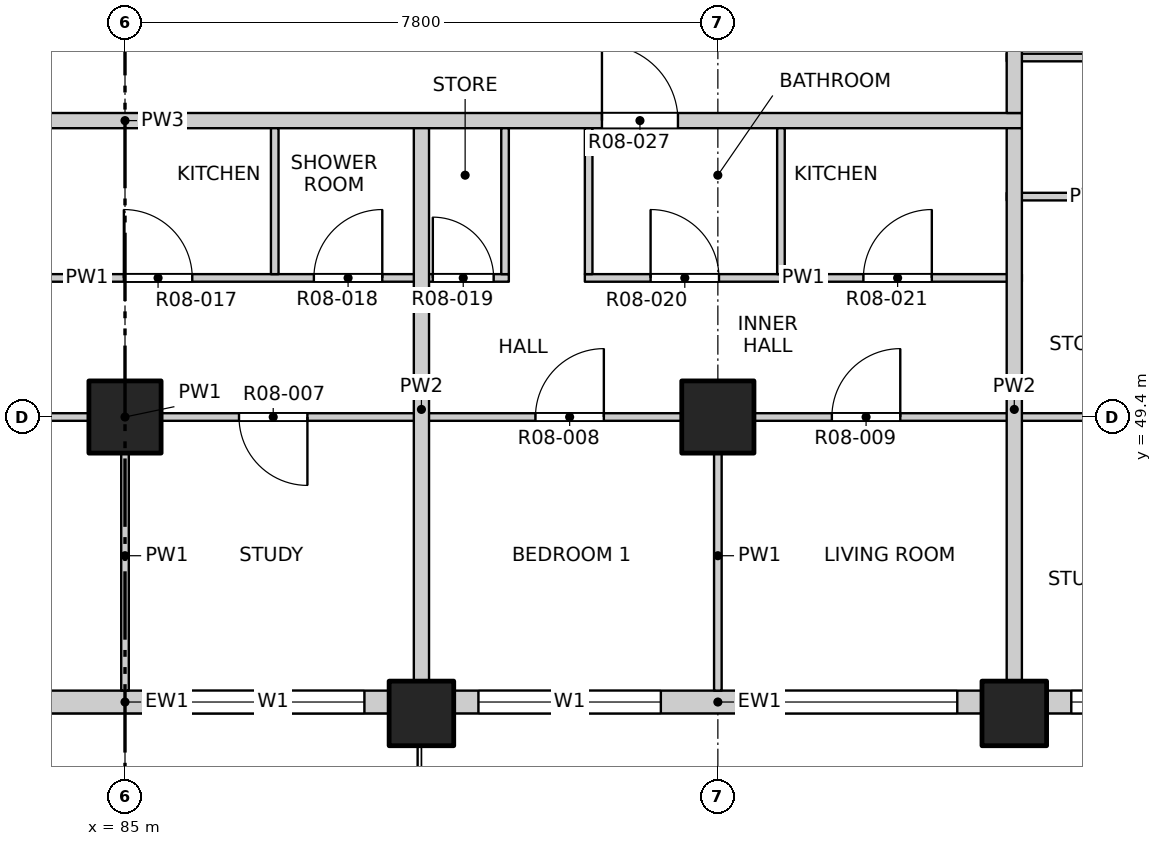
"""IFC4 building model, lengths in metres.
Left out: names, types, materials, properties, quantities, classifications, styles, units other than length and angle.
Written with IfcOpenShell. Run it as: python <this file> out.ifc"""

import sys

from ifc_helpers import new_model, si_unit, direction, frame, frame_2d, origin, origin_2d, place, context, subcontext, project, spatial, rectangle, extrude, element, fill, save


model = new_model("IFC4")
c1 = context("Model", 3, precision=1e-05, world=origin(), true_north=direction((0.0, 1.0)))
c2 = subcontext(c1, "Body", "Model", "MODEL_VIEW")
j1 = project(units=[si_unit("LENGTHUNIT", "METRE"), si_unit("PLANEANGLEUNIT", "RADIAN")], contexts=[c1])
p1 = place(None, origin())
s1 = spatial("IfcSite", under=j1, at=p1, CompositionType="ELEMENT")
p2 = place(p1, origin())
s2 = spatial("IfcBuilding", under=s1, at=p2, CompositionType="ELEMENT")
p3 = place(p2, frame((0.0, 0.0, 103.3)))
s3 = spatial("IfcBuildingStorey", under=s2, at=p3, CompositionType="ELEMENT", Elevation=103.3)
for number, where, z_axis, x_axis in (
    (1, (88.9, 45.5, -0.25), (0.0, 0.0, 1.0), (1.0, 0.0, 0.0)),
    (2, (96.7, 45.5, -0.25), (0.0, 0.0, 1.0), (1.0, 0.0, 0.0)),
):
    element("IfcColumn", number, at=place(p3, frame(where, z_axis=z_axis, x_axis=x_axis)), inside=s3, PredefinedType="COLUMN", context=c2, shape_type="SweptSolid", body=[
        extrude(rectangle(XDim=0.85, YDim=0.85, at=origin_2d()), origin(), (0.0, 0.0, 1.0), 3.4),
    ])
for number, where, z_axis, x_axis in (
    (3, (85.0, 49.4, -0.25), (0.0, 0.0, 1.0), (1.0, 0.0, 0.0)),
    (4, (92.8, 49.4, -0.25), (0.0, 0.0, 1.0), (1.0, 0.0, 0.0)),
):
    element("IfcColumn", number, at=place(p3, frame(where, z_axis=z_axis, x_axis=x_axis)), inside=s3, PredefinedType="COLUMN", context=c2, shape_type="SweptSolid", body=[
        extrude(rectangle(XDim=0.95, YDim=0.95, at=origin_2d()), origin(), (0.0, 0.0, 1.0), 3.4),
    ])
p4 = place(p3, frame((81.525, 45.65, 0.0), z_axis=(0.0, 0.0, 1.0), x_axis=(1.0, 0.0, 0.0)))
e5 = element("IfcWall", 5, at=p4, inside=s3, PredefinedType="SOLIDWALL", context=c2, shape_type="SweptSolid", body=[
    extrude(rectangle(XDim=6.95, YDim=0.3, at=frame_2d((3.475, 0.0))), origin(), (0.0, 0.0, 1.0), 2.7),
])
p5 = place(p4, frame((0.625, 0.0, 0.0)))
e6 = element("IfcOpeningElement", 6, at=p5, cuts=e5, PredefinedType="OPENING", context=c2, shape_type="SweptSolid", body=[
    extrude(rectangle(XDim=1.8, YDim=2.4, at=frame_2d((0.9, 1.2))), frame((0.0, 0.16, 0.0), z_axis=(0.0, -1.0, 0.0), x_axis=(1.0, 0.0, 0.0)), (0.0, 0.0, 1.0), 0.32),
])
p6 = place(p4, frame((4.225, 0.0, 0.9)))
e7 = element("IfcOpeningElement", 7, at=p6, cuts=e5, PredefinedType="OPENING", context=c2, shape_type="SweptSolid", body=[
    extrude(rectangle(XDim=2.4, YDim=1.8, at=frame_2d((1.2, 0.9))), frame((0.0, 0.16, 0.0), z_axis=(0.0, -1.0, 0.0), x_axis=(1.0, 0.0, 0.0)), (0.0, 0.0, 1.0), 0.32),
])
p7 = place(p3, frame((89.325, 45.65, 0.0), z_axis=(0.0, 0.0, 1.0), x_axis=(1.0, 0.0, 0.0)))
e8 = element("IfcWall", 8, at=p7, inside=s3, PredefinedType="SOLIDWALL", context=c2, shape_type="SweptSolid", body=[
    extrude(rectangle(XDim=6.95, YDim=0.3, at=frame_2d((3.475, 0.0))), origin(), (0.0, 0.0, 1.0), 2.7),
])
p8 = place(p7, frame((0.325, 0.0, 0.9)))
e9 = element("IfcOpeningElement", 9, at=p8, cuts=e8, PredefinedType="OPENING", context=c2, shape_type="SweptSolid", body=[
    extrude(rectangle(XDim=2.4, YDim=1.8, at=frame_2d((1.2, 0.9))), frame((0.0, 0.16, 0.0), z_axis=(0.0, -1.0, 0.0), x_axis=(1.0, 0.0, 0.0)), (0.0, 0.0, 1.0), 0.32),
])
p9 = place(p7, frame((4.225, 0.0, 0.9)))
e10 = element("IfcOpeningElement", 10, at=p9, cuts=e8, PredefinedType="OPENING", context=c2, shape_type="SweptSolid", body=[
    extrude(rectangle(XDim=2.4, YDim=1.8, at=frame_2d((1.2, 0.9))), frame((0.0, 0.16, 0.0), z_axis=(0.0, -1.0, 0.0), x_axis=(1.0, 0.0, 0.0)), (0.0, 0.0, 1.0), 0.32),
])
p10 = place(p3, frame((97.125, 45.65, 0.0), z_axis=(0.0, 0.0, 1.0), x_axis=(1.0, 0.0, 0.0)))
e11 = element("IfcWall", 11, at=p10, inside=s3, PredefinedType="SOLIDWALL", context=c2, shape_type="SweptSolid", body=[
    extrude(rectangle(XDim=3.475, YDim=0.3, at=frame_2d((1.738, 0.0))), origin(), (0.0, 0.0, 1.0), 2.7),
])
p11 = place(p10, frame((0.325, 0.0, 0.9)))
e12 = element("IfcOpeningElement", 12, at=p11, cuts=e11, PredefinedType="OPENING", context=c2, shape_type="SweptSolid", body=[
    extrude(rectangle(XDim=2.4, YDim=1.8, at=frame_2d((1.2, 0.9))), frame((0.0, 0.16, 0.0), z_axis=(0.0, -1.0, 0.0), x_axis=(1.0, 0.0, 0.0)), (0.0, 0.0, 1.0), 0.32),
])
p12 = place(p3, frame((65.8, 49.4, 0.0), z_axis=(0.0, 0.0, 1.0), x_axis=(1.0, 0.0, 0.0)))
e13 = element("IfcWall", 13, at=p12, inside=s3, PredefinedType="PARTITIONING", context=c2, shape_type="SweptSolid", body=[
    extrude(rectangle(XDim=38.4, YDim=0.1, at=frame_2d((19.2, 0.0))), origin(), (0.0, 0.0, 1.0), 3.15),
])
p13 = place(p12, frame((4.19, 0.0, 0.0)))
e14 = element("IfcOpeningElement", 14, at=p13, cuts=e13, PredefinedType="OPENING", context=c2, shape_type="SweptSolid", body=[
    extrude(rectangle(XDim=0.9, YDim=2.1, at=frame_2d((0.45, 1.05))), frame((0.0, 0.06, 0.0), z_axis=(0.0, -1.0, 0.0), x_axis=(1.0, 0.0, 0.0)), (0.0, 0.0, 1.0), 0.12),
])
p14 = place(p12, frame((9.0, 0.0, 0.0)))
e15 = element("IfcOpeningElement", 15, at=p14, cuts=e13, PredefinedType="OPENING", context=c2, shape_type="SweptSolid", body=[
    extrude(rectangle(XDim=0.9, YDim=2.1, at=frame_2d((0.45, 1.05))), frame((0.0, 0.06, 0.0), z_axis=(0.0, -1.0, 0.0), x_axis=(1.0, 0.0, 0.0)), (0.0, 0.0, 1.0), 0.12),
])
p15 = place(p12, frame((12.9, 0.0, 0.0)))
e16 = element("IfcOpeningElement", 16, at=p15, cuts=e13, PredefinedType="OPENING", context=c2, shape_type="SweptSolid", body=[
    extrude(rectangle(XDim=0.9, YDim=2.1, at=frame_2d((0.45, 1.05))), frame((0.0, 0.06, 0.0), z_axis=(0.0, -1.0, 0.0), x_axis=(1.0, 0.0, 0.0)), (0.0, 0.0, 1.0), 0.12),
])
p16 = place(p12, frame((16.8, 0.0, 0.0)))
e17 = element("IfcOpeningElement", 17, at=p16, cuts=e13, PredefinedType="OPENING", context=c2, shape_type="SweptSolid", body=[
    extrude(rectangle(XDim=0.9, YDim=2.1, at=frame_2d((0.45, 1.05))), frame((0.0, 0.06, 0.0), z_axis=(0.0, -1.0, 0.0), x_axis=(1.0, 0.0, 0.0)), (0.0, 0.0, 1.0), 0.12),
])
p17 = place(p12, frame((20.7, 0.0, 0.0)))
e18 = element("IfcOpeningElement", 18, at=p17, cuts=e13, PredefinedType="OPENING", context=c2, shape_type="SweptSolid", body=[
    extrude(rectangle(XDim=0.9, YDim=2.1, at=frame_2d((0.45, 1.05))), frame((0.0, 0.06, 0.0), z_axis=(0.0, -1.0, 0.0), x_axis=(1.0, 0.0, 0.0)), (0.0, 0.0, 1.0), 0.12),
])
p18 = place(p12, frame((24.6, 0.0, 0.0)))
e19 = element("IfcOpeningElement", 19, at=p18, cuts=e13, PredefinedType="OPENING", context=c2, shape_type="SweptSolid", body=[
    extrude(rectangle(XDim=0.9, YDim=2.1, at=frame_2d((0.45, 1.05))), frame((0.0, 0.06, 0.0), z_axis=(0.0, -1.0, 0.0), x_axis=(1.0, 0.0, 0.0)), (0.0, 0.0, 1.0), 0.12),
])
p19 = place(p12, frame((28.5, 0.0, 0.0)))
e20 = element("IfcOpeningElement", 20, at=p19, cuts=e13, PredefinedType="OPENING", context=c2, shape_type="SweptSolid", body=[
    extrude(rectangle(XDim=0.9, YDim=2.1, at=frame_2d((0.45, 1.05))), frame((0.0, 0.06, 0.0), z_axis=(0.0, -1.0, 0.0), x_axis=(1.0, 0.0, 0.0)), (0.0, 0.0, 1.0), 0.12),
])
p20 = place(p12, frame((33.31, 0.0, 0.0)))
e21 = element("IfcOpeningElement", 21, at=p20, cuts=e13, PredefinedType="OPENING", context=c2, shape_type="SweptSolid", body=[
    extrude(rectangle(XDim=0.9, YDim=2.1, at=frame_2d((0.45, 1.05))), frame((0.0, 0.06, 0.0), z_axis=(0.0, -1.0, 0.0), x_axis=(1.0, 0.0, 0.0)), (0.0, 0.0, 1.0), 0.12),
])
p21 = place(p3, frame((78.95, 51.23, 0.0), z_axis=(0.0, 0.0, 1.0), x_axis=(1.0, 0.0, 0.0)))
e22 = element("IfcWall", 22, at=p21, inside=s3, PredefinedType="PARTITIONING", context=c2, shape_type="SweptSolid", body=[
    extrude(rectangle(XDim=11.1, YDim=0.1, at=frame_2d((5.55, 0.0))), origin(), (0.0, 0.0, 1.0), 3.15),
])
p22 = place(p21, frame((0.875, 0.0, 0.0)))
e23 = element("IfcOpeningElement", 23, at=p22, cuts=e22, PredefinedType="OPENING", context=c2, shape_type="SweptSolid", body=[
    extrude(rectangle(XDim=0.8, YDim=2.1, at=frame_2d((0.4, 1.05))), frame((0.0, 0.06, 0.0), z_axis=(0.0, -1.0, 0.0), x_axis=(1.0, 0.0, 0.0)), (0.0, 0.0, 1.0), 0.12),
])
p23 = place(p21, frame((3.325, 0.0, 0.0)))
e24 = element("IfcOpeningElement", 24, at=p23, cuts=e22, PredefinedType="OPENING", context=c2, shape_type="SweptSolid", body=[
    extrude(rectangle(XDim=0.8, YDim=2.1, at=frame_2d((0.4, 1.05))), frame((0.0, 0.06, 0.0), z_axis=(0.0, -1.0, 0.0), x_axis=(1.0, 0.0, 0.0)), (0.0, 0.0, 1.0), 0.12),
])
p24 = place(p21, frame((6.035, 0.0, 0.0)))
e25 = element("IfcOpeningElement", 25, at=p24, cuts=e22, PredefinedType="OPENING", context=c2, shape_type="SweptSolid", body=[
    extrude(rectangle(XDim=0.9, YDim=2.1, at=frame_2d((0.45, 1.05))), frame((0.0, 0.06, 0.0), z_axis=(0.0, -1.0, 0.0), x_axis=(1.0, 0.0, 0.0)), (0.0, 0.0, 1.0), 0.12),
])
p25 = place(p21, frame((8.535, 0.0, 0.0)))
e26 = element("IfcOpeningElement", 26, at=p25, cuts=e22, PredefinedType="OPENING", context=c2, shape_type="SweptSolid", body=[
    extrude(rectangle(XDim=0.9, YDim=2.1, at=frame_2d((0.45, 1.05))), frame((0.0, 0.06, 0.0), z_axis=(0.0, -1.0, 0.0), x_axis=(1.0, 0.0, 0.0)), (0.0, 0.0, 1.0), 0.12),
])
p26 = place(p21, frame((10.1, 0.0, 0.0)))
e27 = element("IfcOpeningElement", 27, at=p26, cuts=e22, PredefinedType="OPENING", context=c2, shape_type="SweptSolid", body=[
    extrude(rectangle(XDim=0.8, YDim=2.1, at=frame_2d((0.4, 1.05))), frame((0.0, 0.06, 0.0), z_axis=(0.0, -1.0, 0.0), x_axis=(1.0, 0.0, 0.0)), (0.0, 0.0, 1.0), 0.12),
])
p27 = place(p3, frame((91.05, 51.23, 0.0), z_axis=(0.0, 0.0, 1.0), x_axis=(1.0, 0.0, 0.0)))
e28 = element("IfcWall", 28, at=p27, inside=s3, PredefinedType="PARTITIONING", context=c2, shape_type="SweptSolid", body=[
    extrude(rectangle(XDim=5.75, YDim=0.1, at=frame_2d((2.875, 0.0))), origin(), (0.0, 0.0, 1.0), 3.15),
])
p28 = place(p27, frame((0.865, 0.0, 0.0)))
e29 = element("IfcOpeningElement", 29, at=p28, cuts=e28, PredefinedType="OPENING", context=c2, shape_type="SweptSolid", body=[
    extrude(rectangle(XDim=0.9, YDim=2.1, at=frame_2d((0.45, 1.05))), frame((0.0, 0.06, 0.0), z_axis=(0.0, -1.0, 0.0), x_axis=(1.0, 0.0, 0.0)), (0.0, 0.0, 1.0), 0.12),
])
p29 = place(p27, frame((3.665, 0.0, 0.0)))
e30 = element("IfcOpeningElement", 30, at=p29, cuts=e28, PredefinedType="OPENING", context=c2, shape_type="SweptSolid", body=[
    extrude(rectangle(XDim=0.9, YDim=2.1, at=frame_2d((0.45, 1.05))), frame((0.0, 0.06, 0.0), z_axis=(0.0, -1.0, 0.0), x_axis=(1.0, 0.0, 0.0)), (0.0, 0.0, 1.0), 0.12),
])
p30 = place(p3, frame((96.6, 52.3, 0.0), z_axis=(0.0, 0.0, 1.0), x_axis=(1.0, 0.0, 0.0)))
e31 = element("IfcWall", 31, at=p30, inside=s3, PredefinedType="PARTITIONING", context=c2, shape_type="SweptSolid", body=[
    extrude(rectangle(XDim=2.22, YDim=0.1, at=frame_2d((1.11, 0.0))), origin(), (0.0, 0.0, 1.0), 3.15),
])
p31 = place(p3, frame((73.2, 53.3, 0.0), z_axis=(0.0, 0.0, 1.0), x_axis=(1.0, 0.0, 0.0)))
e32 = element("IfcWall", 32, at=p31, inside=s3, PredefinedType="PARTITIONING", context=c2, shape_type="SweptSolid", body=[
    extrude(rectangle(XDim=23.6, YDim=0.2, at=frame_2d((11.8, 0.0))), origin(), (0.0, 0.0, 1.0), 3.15),
])
p32 = place(p31, frame((5.975, 0.0, 0.0)))
e33 = element("IfcOpeningElement", 33, at=p32, cuts=e32, PredefinedType="OPENING", context=c2, shape_type="SweptSolid", body=[
    extrude(rectangle(XDim=1.0, YDim=2.1, at=frame_2d((0.5, 1.05))), frame((0.0, 0.11, 0.0), z_axis=(0.0, -1.0, 0.0), x_axis=(1.0, 0.0, 0.0)), (0.0, 0.0, 1.0), 0.22),
])
p33 = place(p31, frame((18.075, 0.0, 0.0)))
e34 = element("IfcOpeningElement", 34, at=p33, cuts=e32, PredefinedType="OPENING", context=c2, shape_type="SweptSolid", body=[
    extrude(rectangle(XDim=1.0, YDim=2.1, at=frame_2d((0.5, 1.05))), frame((0.0, 0.11, 0.0), z_axis=(0.0, -1.0, 0.0), x_axis=(1.0, 0.0, 0.0)), (0.0, 0.0, 1.0), 0.22),
])
p34 = place(p3, frame((96.6, 54.13, 0.0), z_axis=(0.0, 0.0, 1.0), x_axis=(1.0, 0.0, 0.0)))
e35 = element("IfcWall", 35, at=p34, inside=s3, PredefinedType="PARTITIONING", context=c2, shape_type="SweptSolid", body=[
    extrude(rectangle(XDim=2.22, YDim=0.1, at=frame_2d((1.11, 0.0))), origin(), (0.0, 0.0, 1.0), 3.15),
])
p35 = place(p3, frame((85.0, 45.8, 0.0), z_axis=(0.0, 0.0, 1.0), x_axis=(0.0, 1.0, 0.0)))
e36 = element("IfcWall", 36, at=p35, inside=s3, PredefinedType="PARTITIONING", context=c2, shape_type="SweptSolid", body=[
    extrude(rectangle(XDim=3.55, YDim=0.1, at=frame_2d((1.775, 0.0))), origin(), (0.0, 0.0, 1.0), 3.15),
])
p36 = place(p3, frame((86.97, 51.28, 0.0), z_axis=(0.0, 0.0, 1.0), x_axis=(0.0, 1.0, 0.0)))
e37 = element("IfcWall", 37, at=p36, inside=s3, PredefinedType="PARTITIONING", context=c2, shape_type="SweptSolid", body=[
    extrude(rectangle(XDim=1.92, YDim=0.1, at=frame_2d((0.96, 0.0))), origin(), (0.0, 0.0, 1.0), 3.15),
])
p37 = place(p3, frame((88.9, 45.8, 0.0), z_axis=(0.0, 0.0, 1.0), x_axis=(0.0, 1.0, 0.0)))
e38 = element("IfcWall", 38, at=p37, inside=s3, PredefinedType="PARTITIONING", context=c2, shape_type="SweptSolid", body=[
    extrude(rectangle(XDim=7.4, YDim=0.2, at=frame_2d((3.7, 0.0))), origin(), (0.0, 0.0, 1.0), 2.55),
])
for number, where, z_axis, x_axis in (
    (39, (90.0, 51.28, 0.0), (0.0, 0.0, 1.0), (0.0, 1.0, 0.0)),
    (40, (91.1, 51.28, 0.0), (0.0, 0.0, 1.0), (0.0, 1.0, 0.0)),
):
    element("IfcWall", number, at=place(p3, frame(where, z_axis=z_axis, x_axis=x_axis)), inside=s3, PredefinedType="PARTITIONING", context=c2, shape_type="SweptSolid", body=[
        extrude(rectangle(XDim=1.92, YDim=0.1, at=frame_2d((0.96, 0.0))), origin(), (0.0, 0.0, 1.0), 3.15),
    ])
p38 = place(p3, frame((92.8, 45.8, 0.0), z_axis=(0.0, 0.0, 1.0), x_axis=(0.0, 1.0, 0.0)))
e41 = element("IfcWall", 41, at=p38, inside=s3, PredefinedType="PARTITIONING", context=c2, shape_type="SweptSolid", body=[
    extrude(rectangle(XDim=3.55, YDim=0.1, at=frame_2d((1.775, 0.0))), origin(), (0.0, 0.0, 1.0), 3.15),
])
p39 = place(p3, frame((93.63, 51.28, 0.0), z_axis=(0.0, 0.0, 1.0), x_axis=(0.0, 1.0, 0.0)))
e42 = element("IfcWall", 42, at=p39, inside=s3, PredefinedType="PARTITIONING", context=c2, shape_type="SweptSolid", body=[
    extrude(rectangle(XDim=1.92, YDim=0.1, at=frame_2d((0.96, 0.0))), origin(), (0.0, 0.0, 1.0), 3.15),
])
p40 = place(p3, frame((96.7, 45.8, 0.0), z_axis=(0.0, 0.0, 1.0), x_axis=(0.0, 1.0, 0.0)))
e43 = element("IfcWall", 43, at=p40, inside=s3, PredefinedType="PARTITIONING", context=c2, shape_type="SweptSolid", body=[
    extrude(rectangle(XDim=7.4, YDim=0.2, at=frame_2d((3.7, 0.0))), origin(), (0.0, 0.0, 1.0), 3.15),
])
p41 = place(p3, frame((96.7, 53.4, 0.0), z_axis=(0.0, 0.0, 1.0), x_axis=(0.0, 1.0, 0.0)))
e44 = element("IfcWall", 44, at=p41, inside=s3, PredefinedType="PARTITIONING", context=c2, shape_type="SweptSolid", body=[
    extrude(rectangle(XDim=30.8, YDim=0.2, at=frame_2d((15.4, 0.0))), origin(), (0.0, 0.0, 1.0), 3.15),
])
p42 = place(p41, frame((5.525, 0.0, 0.0)))
e45 = element("IfcOpeningElement", 45, at=p42, cuts=e44, PredefinedType="OPENING", context=c2, shape_type="SweptSolid", body=[
    extrude(rectangle(XDim=1.0, YDim=2.1, at=frame_2d((0.5, 1.05))), frame((0.0, 0.11, 0.0), z_axis=(0.0, -1.0, 0.0), x_axis=(1.0, 0.0, 0.0)), (0.0, 0.0, 1.0), 0.22),
])
p43 = place(p41, frame((13.775, 0.0, 0.0)))
e46 = element("IfcOpeningElement", 46, at=p43, cuts=e44, PredefinedType="OPENING", context=c2, shape_type="SweptSolid", body=[
    extrude(rectangle(XDim=1.0, YDim=2.1, at=frame_2d((0.5, 1.05))), frame((0.0, 0.11, 0.0), z_axis=(0.0, -1.0, 0.0), x_axis=(1.0, 0.0, 0.0)), (0.0, 0.0, 1.0), 0.22),
])
p44 = place(p41, frame((22.125, 0.0, 0.0)))
e47 = element("IfcOpeningElement", 47, at=p44, cuts=e44, PredefinedType="OPENING", context=c2, shape_type="SweptSolid", body=[
    extrude(rectangle(XDim=1.0, YDim=2.1, at=frame_2d((0.5, 1.05))), frame((0.0, 0.11, 0.0), z_axis=(0.0, -1.0, 0.0), x_axis=(1.0, 0.0, 0.0)), (0.0, 0.0, 1.0), 0.22),
])
p45 = place(p6, origin())
e48 = element("IfcWindow", 48, at=p45, inside=s3, PartitioningType="DOUBLE_PANEL_VERTICAL", PredefinedType="WINDOW", context=c2, shape_type="SweptSolid", body=[
    extrude(rectangle(XDim=2.4, YDim=1.8, at=frame_2d((1.2, 0.9))), frame((0.0, 0.03, 0.0), z_axis=(0.0, -1.0, 0.0), x_axis=(1.0, 0.0, 0.0)), (0.0, 0.0, 1.0), 0.06),
])
fill(e7, e48)
p46 = place(p8, origin())
e49 = element("IfcWindow", 49, at=p46, inside=s3, PartitioningType="DOUBLE_PANEL_VERTICAL", PredefinedType="WINDOW", context=c2, shape_type="SweptSolid", body=[
    extrude(rectangle(XDim=2.4, YDim=1.8, at=frame_2d((1.2, 0.9))), frame((0.0, 0.03, 0.0), z_axis=(0.0, -1.0, 0.0), x_axis=(1.0, 0.0, 0.0)), (0.0, 0.0, 1.0), 0.06),
])
fill(e9, e49)
p47 = place(p9, origin())
e50 = element("IfcWindow", 50, at=p47, inside=s3, PartitioningType="DOUBLE_PANEL_VERTICAL", PredefinedType="WINDOW", context=c2, shape_type="SweptSolid", body=[
    extrude(rectangle(XDim=2.4, YDim=1.8, at=frame_2d((1.2, 0.9))), frame((0.0, 0.03, 0.0), z_axis=(0.0, -1.0, 0.0), x_axis=(1.0, 0.0, 0.0)), (0.0, 0.0, 1.0), 0.06),
])
fill(e10, e50)
p48 = place(p11, origin())
e51 = element("IfcWindow", 51, at=p48, inside=s3, PartitioningType="DOUBLE_PANEL_VERTICAL", PredefinedType="WINDOW", context=c2, shape_type="SweptSolid", body=[
    extrude(rectangle(XDim=2.4, YDim=1.8, at=frame_2d((1.2, 0.9))), frame((0.0, 0.03, 0.0), z_axis=(0.0, -1.0, 0.0), x_axis=(1.0, 0.0, 0.0)), (0.0, 0.0, 1.0), 0.06),
])
fill(e12, e51)
p49 = place(p17, origin())
e52 = element("IfcDoor", 52, at=p49, inside=s3, OperationType="SINGLE_SWING_LEFT", PredefinedType="DOOR", context=c2, shape_type="SweptSolid", body=[
    extrude(rectangle(XDim=0.9, YDim=2.1, at=frame_2d((0.45, 1.05))), frame((0.0, 0.025, 0.0), z_axis=(0.0, -1.0, 0.0), x_axis=(1.0, 0.0, 0.0)), (0.0, 0.0, 1.0), 0.05),
])
fill(e18, e52)
p50 = place(p18, origin())
e53 = element("IfcDoor", 53, at=p50, inside=s3, OperationType="SINGLE_SWING_RIGHT", PredefinedType="DOOR", context=c2, shape_type="SweptSolid", body=[
    extrude(rectangle(XDim=0.9, YDim=2.1, at=frame_2d((0.45, 1.05))), frame((0.0, 0.025, 0.0), z_axis=(0.0, -1.0, 0.0), x_axis=(1.0, 0.0, 0.0)), (0.0, 0.0, 1.0), 0.05),
])
fill(e19, e53)
p51 = place(p19, origin())
e54 = element("IfcDoor", 54, at=p51, inside=s3, OperationType="SINGLE_SWING_RIGHT", PredefinedType="DOOR", context=c2, shape_type="SweptSolid", body=[
    extrude(rectangle(XDim=0.9, YDim=2.1, at=frame_2d((0.45, 1.05))), frame((0.0, 0.025, 0.0), z_axis=(0.0, -1.0, 0.0), x_axis=(1.0, 0.0, 0.0)), (0.0, 0.0, 1.0), 0.05),
])
fill(e20, e54)
p52 = place(p24, origin())
e55 = element("IfcDoor", 55, at=p52, inside=s3, OperationType="SINGLE_SWING_LEFT", PredefinedType="DOOR", context=c2, shape_type="SweptSolid", body=[
    extrude(rectangle(XDim=0.9, YDim=2.1, at=frame_2d((0.45, 1.05))), frame((0.0, 0.025, 0.0), z_axis=(0.0, -1.0, 0.0), x_axis=(1.0, 0.0, 0.0)), (0.0, 0.0, 1.0), 0.05),
])
fill(e25, e55)
p53 = place(p25, origin())
e56 = element("IfcDoor", 56, at=p53, inside=s3, OperationType="SINGLE_SWING_RIGHT", PredefinedType="DOOR", context=c2, shape_type="SweptSolid", body=[
    extrude(rectangle(XDim=0.9, YDim=2.1, at=frame_2d((0.45, 1.05))), frame((0.0, 0.025, 0.0), z_axis=(0.0, -1.0, 0.0), x_axis=(1.0, 0.0, 0.0)), (0.0, 0.0, 1.0), 0.05),
])
fill(e26, e56)
p54 = place(p26, origin())
e57 = element("IfcDoor", 57, at=p54, inside=s3, OperationType="SINGLE_SWING_LEFT", PredefinedType="DOOR", context=c2, shape_type="SweptSolid", body=[
    extrude(rectangle(XDim=0.8, YDim=2.1, at=frame_2d((0.4, 1.05))), frame((0.0, 0.025, 0.0), z_axis=(0.0, -1.0, 0.0), x_axis=(1.0, 0.0, 0.0)), (0.0, 0.0, 1.0), 0.05),
])
fill(e27, e57)
p55 = place(p28, origin())
e58 = element("IfcDoor", 58, at=p55, inside=s3, OperationType="SINGLE_SWING_LEFT", PredefinedType="DOOR", context=c2, shape_type="SweptSolid", body=[
    extrude(rectangle(XDim=0.9, YDim=2.1, at=frame_2d((0.45, 1.05))), frame((0.0, 0.025, 0.0), z_axis=(0.0, -1.0, 0.0), x_axis=(1.0, 0.0, 0.0)), (0.0, 0.0, 1.0), 0.05),
])
fill(e29, e58)
p56 = place(p29, origin())
e59 = element("IfcDoor", 59, at=p56, inside=s3, OperationType="SINGLE_SWING_RIGHT", PredefinedType="DOOR", context=c2, shape_type="SweptSolid", body=[
    extrude(rectangle(XDim=0.9, YDim=2.1, at=frame_2d((0.45, 1.05))), frame((0.0, 0.025, 0.0), z_axis=(0.0, -1.0, 0.0), x_axis=(1.0, 0.0, 0.0)), (0.0, 0.0, 1.0), 0.05),
])
fill(e30, e59)
p57 = place(p33, origin())
e60 = element("IfcDoor", 60, at=p57, inside=s3, OperationType="SINGLE_SWING_LEFT", PredefinedType="DOOR", context=c2, shape_type="SweptSolid", body=[
    extrude(rectangle(XDim=1.0, YDim=2.1, at=frame_2d((0.5, 1.05))), frame((0.0, 0.025, 0.0), z_axis=(0.0, -1.0, 0.0), x_axis=(1.0, 0.0, 0.0)), (0.0, 0.0, 1.0), 0.05),
])
fill(e34, e60)
save(model, sys.argv[1])
